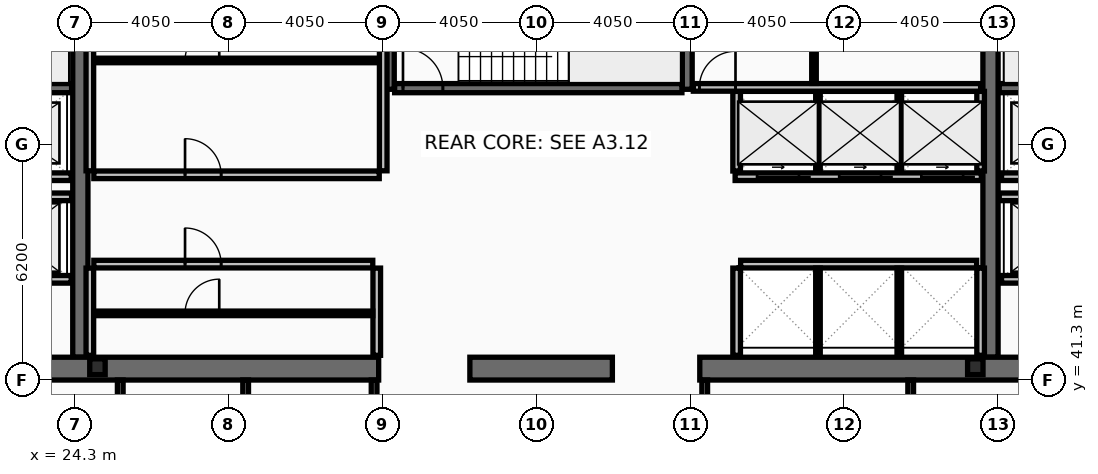
"""IFC4 building model, lengths in metres.
Left out: names, types, materials, properties, quantities, classifications, styles, units other than length and angle.
Written with IfcOpenShell. Run it as: python <this file> out.ifc"""

import sys

from ifc_helpers import new_model, si_unit, direction, frame, frame_2d, origin, origin_2d, place, context, subcontext, project, spatial, rectangle, i_section, extrude, element, fill, save


model = new_model("IFC4")
c1 = context("Model", 3, precision=1e-05, world=origin(), true_north=direction((0.0, 1.0)))
c2 = subcontext(c1, "Body", "Model", "MODEL_VIEW")
j1 = project(units=[si_unit("LENGTHUNIT", "METRE"), si_unit("PLANEANGLEUNIT", "RADIAN")], contexts=[c1])
p1 = place(None, origin())
s1 = spatial("IfcSite", under=j1, at=p1, CompositionType="ELEMENT")
p2 = place(p1, origin())
s2 = spatial("IfcBuilding", under=s1, at=p2, CompositionType="ELEMENT")
p3 = place(p2, frame((0.0, 0.0, 239.0)))
s3 = spatial("IfcBuildingStorey", under=s2, at=p3, CompositionType="ELEMENT", Elevation=239.0)
for number, where, z_axis, x_axis in (
    (1, (24.45, 41.9, 0.0), (0.0, 0.0, 1.0), (0.0, 1.0, 0.0)),
    (2, (48.4, 41.9, 0.0), (0.0, 0.0, 1.0), (0.0, 1.0, 0.0)),
):
    element("IfcWall", number, at=place(p3, frame(where, z_axis=z_axis, x_axis=x_axis)), inside=s3, PredefinedType="SHEAR", context=c2, shape_type="SweptSolid", body=[
        extrude(rectangle(XDim=11.2, YDim=0.4, at=frame_2d((5.6, 0.0))), origin(), (0.0, 0.0, 1.0), 3.44),
    ])
p4 = place(p3, frame((32.3, 41.6, 0.0), z_axis=(0.0, 0.0, 1.0), x_axis=(-1.0, 0.0, 0.0)))
e3 = element("IfcWall", 3, at=p4, inside=s3, PredefinedType="SHEAR", context=c2, shape_type="SweptSolid", body=[
    extrude(rectangle(XDim=11.45, YDim=0.6, at=frame_2d((5.725, 0.0))), origin(), (0.0, 0.0, 1.0), 3.44),
])
p5 = place(p3, frame((38.45, 41.6, 0.0), z_axis=(0.0, 0.0, 1.0), x_axis=(-1.0, 0.0, 0.0)))
e4 = element("IfcWall", 4, at=p5, inside=s3, PredefinedType="SHEAR", context=c2, shape_type="SweptSolid", body=[
    extrude(rectangle(XDim=3.75, YDim=0.6, at=frame_2d((1.875, 0.0))), origin(), (0.0, 0.0, 1.0), 3.44),
])
p6 = place(p3, frame((52.05, 41.6, 0.0), z_axis=(0.0, 0.0, 1.0), x_axis=(-1.0, 0.0, 0.0)))
e5 = element("IfcWall", 5, at=p6, inside=s3, PredefinedType="SHEAR", context=c2, shape_type="SweptSolid", body=[
    extrude(rectangle(XDim=11.3, YDim=0.6, at=frame_2d((5.65, 0.0))), origin(), (0.0, 0.0, 1.0), 3.44),
])
for number, where, z_axis, x_axis in (
    (6, (32.58, 48.95, 0.0), (0.0, 0.0, 1.0), (0.0, 1.0, 0.0)),
    (7, (40.42, 48.95, 0.0), (0.0, 0.0, 1.0), (0.0, 1.0, 0.0)),
):
    element("IfcWall", number, at=place(p3, frame(where, z_axis=z_axis, x_axis=x_axis)), inside=s3, PredefinedType="SHEAR", context=c2, shape_type="SweptSolid", body=[
        extrude(rectangle(XDim=4.15, YDim=0.26, at=frame_2d((2.075, 0.0))), origin(), (0.0, 0.0, 1.0), 3.44),
    ])
p7 = place(p3, frame((16.8, 48.98, 0.0), z_axis=(0.0, 0.0, 1.0), x_axis=(1.0, 0.0, 0.0)))
e8 = element("IfcWall", 8, at=p7, inside=s3, PredefinedType="SHEAR", context=c2, shape_type="SweptSolid", body=[
    extrude(rectangle(XDim=7.42, YDim=0.24, at=frame_2d((3.71, 0.0))), origin(), (0.0, 0.0, 1.0), 3.44),
])
p8 = place(p7, frame((0.22, 0.0, 0.0)))
e9 = element("IfcOpeningElement", 9, at=p8, cuts=e8, PredefinedType="OPENING", context=c2, shape_type="SweptSolid", body=[
    extrude(rectangle(XDim=1.05, YDim=2.15, at=frame_2d((0.525, 1.075))), frame((0.0, 0.13, 0.0), z_axis=(0.0, -1.0, 0.0), x_axis=(1.0, 0.0, 0.0)), (0.0, 0.0, 1.0), 0.26),
])
p9 = place(p3, frame((48.63, 48.98, 0.0), z_axis=(0.0, 0.0, 1.0), x_axis=(1.0, 0.0, 0.0)))
e10 = element("IfcWall", 10, at=p9, inside=s3, PredefinedType="SHEAR", context=c2, shape_type="SweptSolid", body=[
    extrude(rectangle(XDim=7.47, YDim=0.24, at=frame_2d((3.735, 0.0))), origin(), (0.0, 0.0, 1.0), 3.44),
])
p10 = place(p9, frame((6.2, 0.0, 0.0)))
e11 = element("IfcOpeningElement", 11, at=p10, cuts=e10, PredefinedType="OPENING", context=c2, shape_type="SweptSolid", body=[
    extrude(rectangle(XDim=1.05, YDim=2.15, at=frame_2d((0.525, 1.075))), frame((0.0, 0.13, 0.0), z_axis=(0.0, -1.0, 0.0), x_axis=(1.0, 0.0, 0.0)), (0.0, 0.0, 1.0), 0.26),
])
p11 = place(p3, frame((32.72, 48.98, 0.0), z_axis=(0.0, 0.0, 1.0), x_axis=(1.0, 0.0, 0.0)))
e12 = element("IfcWall", 12, at=p11, inside=s3, PredefinedType="SHEAR", context=c2, shape_type="SweptSolid", body=[
    extrude(rectangle(XDim=7.56, YDim=0.24, at=frame_2d((3.78, 0.0))), origin(), (0.0, 0.0, 1.0), 3.44),
])
p12 = place(p11, frame((0.22, 0.0, 0.0)))
e13 = element("IfcOpeningElement", 13, at=p12, cuts=e12, PredefinedType="OPENING", context=c2, shape_type="SweptSolid", body=[
    extrude(rectangle(XDim=1.05, YDim=2.15, at=frame_2d((0.525, 1.075))), frame((0.0, 0.13, 0.0), z_axis=(0.0, -1.0, 0.0), x_axis=(1.0, 0.0, 0.0)), (0.0, 0.0, 1.0), 0.26),
])
for number, where, z_axis, x_axis in (
    (14, (24.9, 41.65, 0.0), (0.0, 0.0, 1.0), (1.0, 0.0, 0.0)),
    (15, (48.0, 41.65, 0.0), (0.0, 0.0, 1.0), (1.0, 0.0, 0.0)),
):
    element("IfcColumn", number, at=place(p3, frame(where, z_axis=z_axis, x_axis=x_axis)), inside=s3, PredefinedType="COLUMN", context=c2, shape_type="SweptSolid", body=[
        extrude(i_section(OverallWidth=0.406, OverallDepth=0.416, WebThickness=0.03, FlangeThickness=0.048, at=origin_2d()), origin(), (0.0, 0.0, 1.0), 3.6),
    ])
p13 = place(p3, frame((51.61, 43.95, 0.0), z_axis=(0.0, 0.0, 1.0), x_axis=(-1.0, 0.0, 0.0)))
e16 = element("IfcWall", 16, at=p13, inside=s3, PredefinedType="PARTITIONING", context=c2, shape_type="SweptSolid", body=[
    extrude(rectangle(XDim=2.92, YDim=0.2, at=frame_2d((1.46, 0.0))), origin(), (0.0, 0.0, 1.0), 3.44),
])
p14 = place(p13, frame((0.81, 0.0, 0.0)))
e17 = element("IfcOpeningElement", 17, at=p14, cuts=e16, PredefinedType="OPENING", context=c2, shape_type="SweptSolid", body=[
    extrude(rectangle(XDim=1.3, YDim=2.18, at=frame_2d((0.65, 1.09))), frame((0.0, 0.11, 0.0), z_axis=(0.0, -1.0, 0.0), x_axis=(1.0, 0.0, 0.0)), (0.0, 0.0, 1.0), 0.22),
])
p15 = place(p3, frame((24.21, 43.95, 0.0), z_axis=(0.0, 0.0, 1.0), x_axis=(-1.0, 0.0, 0.0)))
e18 = element("IfcWall", 18, at=p15, inside=s3, PredefinedType="PARTITIONING", context=c2, shape_type="SweptSolid", body=[
    extrude(rectangle(XDim=2.97, YDim=0.2, at=frame_2d((1.485, 0.0))), origin(), (0.0, 0.0, 1.0), 3.44),
])
p16 = place(p15, frame((0.86, 0.0, 0.0)))
e19 = element("IfcOpeningElement", 19, at=p16, cuts=e18, PredefinedType="OPENING", context=c2, shape_type="SweptSolid", body=[
    extrude(rectangle(XDim=1.3, YDim=2.18, at=frame_2d((0.65, 1.09))), frame((0.0, 0.11, 0.0), z_axis=(0.0, -1.0, 0.0), x_axis=(1.0, 0.0, 0.0)), (0.0, 0.0, 1.0), 0.22),
])
p17 = place(p3, frame((51.61, 46.65, 0.0), z_axis=(0.0, 0.0, 1.0), x_axis=(-1.0, 0.0, 0.0)))
e20 = element("IfcWall", 20, at=p17, inside=s3, PredefinedType="PARTITIONING", context=c2, shape_type="SweptSolid", body=[
    extrude(rectangle(XDim=2.92, YDim=0.2, at=frame_2d((1.46, 0.0))), origin(), (0.0, 0.0, 1.0), 3.44),
])
p18 = place(p17, frame((0.86, 0.0, 0.0)))
e21 = element("IfcOpeningElement", 21, at=p18, cuts=e20, PredefinedType="OPENING", context=c2, shape_type="SweptSolid", body=[
    extrude(rectangle(XDim=1.2, YDim=2.18, at=frame_2d((0.6, 1.09))), frame((0.0, 0.11, 0.0), z_axis=(0.0, -1.0, 0.0), x_axis=(1.0, 0.0, 0.0)), (0.0, 0.0, 1.0), 0.22),
])
p19 = place(p3, frame((24.21, 46.65, 0.0), z_axis=(0.0, 0.0, 1.0), x_axis=(-1.0, 0.0, 0.0)))
e22 = element("IfcWall", 22, at=p19, inside=s3, PredefinedType="PARTITIONING", context=c2, shape_type="SweptSolid", body=[
    extrude(rectangle(XDim=2.97, YDim=0.2, at=frame_2d((1.485, 0.0))), origin(), (0.0, 0.0, 1.0), 3.44),
])
p20 = place(p19, frame((0.91, 0.0, 0.0)))
e23 = element("IfcOpeningElement", 23, at=p20, cuts=e22, PredefinedType="OPENING", context=c2, shape_type="SweptSolid", body=[
    extrude(rectangle(XDim=1.2, YDim=2.18, at=frame_2d((0.6, 1.09))), frame((0.0, 0.11, 0.0), z_axis=(0.0, -1.0, 0.0), x_axis=(1.0, 0.0, 0.0)), (0.0, 0.0, 1.0), 0.22),
])
p21 = place(p3, frame((48.16, 46.65, 0.0), z_axis=(0.0, 0.0, 1.0), x_axis=(-1.0, 0.0, 0.0)))
e24 = element("IfcWall", 24, at=p21, inside=s3, PredefinedType="PARTITIONING", context=c2, shape_type="SweptSolid", body=[
    extrude(rectangle(XDim=6.48, YDim=0.2, at=frame_2d((3.24, 0.0))), origin(), (0.0, 0.0, 1.0), 3.44),
])
p22 = place(p21, frame((4.8, 0.0, 0.0)))
e25 = element("IfcOpeningElement", 25, at=p22, cuts=e24, PredefinedType="OPENING", context=c2, shape_type="SweptSolid", body=[
    extrude(rectangle(XDim=1.1, YDim=2.18, at=frame_2d((0.55, 1.09))), frame((0.0, 0.11, 0.0), z_axis=(0.0, -1.0, 0.0), x_axis=(1.0, 0.0, 0.0)), (0.0, 0.0, 1.0), 0.22),
])
p23 = place(p21, frame((2.64, 0.0, 0.0)))
e26 = element("IfcOpeningElement", 26, at=p23, cuts=e24, PredefinedType="OPENING", context=c2, shape_type="SweptSolid", body=[
    extrude(rectangle(XDim=1.1, YDim=2.18, at=frame_2d((0.55, 1.09))), frame((0.0, 0.11, 0.0), z_axis=(0.0, -1.0, 0.0), x_axis=(1.0, 0.0, 0.0)), (0.0, 0.0, 1.0), 0.22),
])
p24 = place(p21, frame((0.48, 0.0, 0.0)))
e27 = element("IfcOpeningElement", 27, at=p24, cuts=e24, PredefinedType="OPENING", context=c2, shape_type="SweptSolid", body=[
    extrude(rectangle(XDim=1.1, YDim=2.18, at=frame_2d((0.55, 1.09))), frame((0.0, 0.11, 0.0), z_axis=(0.0, -1.0, 0.0), x_axis=(1.0, 0.0, 0.0)), (0.0, 0.0, 1.0), 0.22),
])
p25 = place(p3, frame((21.2, 46.12, 0.0), z_axis=(0.0, 0.0, 1.0), x_axis=(1.0, 0.0, 0.0)))
e28 = element("IfcWall", 28, at=p25, inside=s3, PredefinedType="PARTITIONING", context=c2, shape_type="SweptSolid", body=[
    extrude(rectangle(XDim=3.02, YDim=0.2, at=frame_2d((1.51, 0.0))), origin(), (0.0, 0.0, 1.0), 3.44),
])
p26 = place(p3, frame((48.63, 46.12, 0.0), z_axis=(0.0, 0.0, 1.0), x_axis=(1.0, 0.0, 0.0)))
e29 = element("IfcWall", 29, at=p26, inside=s3, PredefinedType="PARTITIONING", context=c2, shape_type="SweptSolid", body=[
    extrude(rectangle(XDim=3.07, YDim=0.2, at=frame_2d((1.535, 0.0))), origin(), (0.0, 0.0, 1.0), 3.44),
])
for number, where, z_axis, x_axis in (
    (30, (24.7, 46.805, 0.0), (0.0, 0.0, 1.0), (0.0, 1.0, 0.0)),
    (31, (32.42, 46.805, 0.0), (0.0, 0.0, 1.0), (0.0, 1.0, 0.0)),
):
    element("IfcWall", number, at=place(p3, frame(where, z_axis=z_axis, x_axis=x_axis)), inside=s3, PredefinedType="PARTITIONING", context=c2, shape_type="SweptSolid", body=[
        extrude(rectangle(XDim=5.99, YDim=0.2, at=frame_2d((2.995, 0.0))), origin(), (0.0, 0.0, 1.0), 3.44),
    ])
p27 = place(p3, frame((24.805, 49.709, 0.0), z_axis=(0.0, 0.0, 1.0), x_axis=(1.0, 0.0, 0.0)))
e32 = element("IfcWall", 32, at=p27, inside=s3, PredefinedType="PARTITIONING", context=c2, shape_type="SweptSolid", body=[
    extrude(rectangle(XDim=7.51, YDim=0.12, at=frame_2d((3.755, 0.0))), origin(), (0.0, 0.0, 1.0), 3.44),
])
p28 = place(p27, frame((2.4, 0.0, 0.0)))
e33 = element("IfcOpeningElement", 33, at=p28, cuts=e32, PredefinedType="OPENING", context=c2, shape_type="SweptSolid", body=[
    extrude(rectangle(XDim=0.9, YDim=2.05, at=frame_2d((0.45, 1.025))), frame((0.0, 0.07, 0.0), z_axis=(0.0, -1.0, 0.0), x_axis=(1.0, 0.0, 0.0)), (0.0, 0.0, 1.0), 0.14),
])
p29 = place(p3, frame((24.805, 46.7, 0.0), z_axis=(0.0, 0.0, 1.0), x_axis=(1.0, 0.0, 0.0)))
e34 = element("IfcWall", 34, at=p29, inside=s3, PredefinedType="PARTITIONING", context=c2, shape_type="SweptSolid", body=[
    extrude(rectangle(XDim=7.51, YDim=0.2, at=frame_2d((3.755, 0.0))), origin(), (0.0, 0.0, 1.0), 3.44),
])
p30 = place(p29, frame((2.4, 0.0, 0.0)))
e35 = element("IfcOpeningElement", 35, at=p30, cuts=e34, PredefinedType="OPENING", context=c2, shape_type="SweptSolid", body=[
    extrude(rectangle(XDim=0.95, YDim=2.1, at=frame_2d((0.475, 1.05))), frame((0.0, 0.11, 0.0), z_axis=(0.0, -1.0, 0.0), x_axis=(1.0, 0.0, 0.0)), (0.0, 0.0, 1.0), 0.22),
])
for number, where, z_axis, x_axis in (
    (36, (24.7, 41.95, 0.0), (0.0, 0.0, 1.0), (0.0, 1.0, 0.0)),
    (37, (32.25, 41.95, 0.0), (0.0, 0.0, 1.0), (0.0, 1.0, 0.0)),
):
    element("IfcWall", number, at=place(p3, frame(where, z_axis=z_axis, x_axis=x_axis)), inside=s3, PredefinedType="PARTITIONING", context=c2, shape_type="SweptSolid", body=[
        extrude(rectangle(XDim=2.295, YDim=0.2, at=frame_2d((1.147, 0.0))), origin(), (0.0, 0.0, 1.0), 3.44),
    ])
p31 = place(p3, frame((24.805, 43.054, 0.0), z_axis=(0.0, 0.0, 1.0), x_axis=(1.0, 0.0, 0.0)))
e38 = element("IfcWall", 38, at=p31, inside=s3, PredefinedType="PARTITIONING", context=c2, shape_type="SweptSolid", body=[
    extrude(rectangle(XDim=7.34, YDim=0.12, at=frame_2d((3.67, 0.0))), origin(), (0.0, 0.0, 1.0), 3.44),
])
p32 = place(p31, frame((2.4, 0.0, 0.0)))
e39 = element("IfcOpeningElement", 39, at=p32, cuts=e38, PredefinedType="OPENING", context=c2, shape_type="SweptSolid", body=[
    extrude(rectangle(XDim=0.9, YDim=2.05, at=frame_2d((0.45, 1.025))), frame((0.0, 0.07, 0.0), z_axis=(0.0, -1.0, 0.0), x_axis=(1.0, 0.0, 0.0)), (0.0, 0.0, 1.0), 0.14),
])
p33 = place(p3, frame((24.805, 44.35, 0.0), z_axis=(0.0, 0.0, 1.0), x_axis=(1.0, 0.0, 0.0)))
e40 = element("IfcWall", 40, at=p33, inside=s3, PredefinedType="PARTITIONING", context=c2, shape_type="SweptSolid", body=[
    extrude(rectangle(XDim=7.34, YDim=0.2, at=frame_2d((3.67, 0.0))), origin(), (0.0, 0.0, 1.0), 3.44),
])
p34 = place(p33, frame((2.4, 0.0, 0.0)))
e41 = element("IfcOpeningElement", 41, at=p34, cuts=e40, PredefinedType="OPENING", context=c2, shape_type="SweptSolid", body=[
    extrude(rectangle(XDim=0.95, YDim=2.1, at=frame_2d((0.475, 1.05))), frame((0.0, 0.11, 0.0), z_axis=(0.0, -1.0, 0.0), x_axis=(1.0, 0.0, 0.0)), (0.0, 0.0, 1.0), 0.22),
])
for number, where, z_axis, x_axis in (
    (42, (41.72, 46.8, 0.0), (0.0, 0.0, 1.0), (0.0, 1.0, 0.0)),
    (43, (48.14, 46.8, 0.0), (0.0, 0.0, 1.0), (0.0, 1.0, 0.0)),
):
    element("IfcWall", number, at=place(p3, frame(where, z_axis=z_axis, x_axis=x_axis)), inside=s3, PredefinedType="PARTITIONING", context=c2, shape_type="SweptSolid", body=[
        extrude(rectangle(XDim=2.095, YDim=0.2, at=frame_2d((1.047, 0.0))), origin(), (0.0, 0.0, 1.0), 3.44),
    ])
for number, where, z_axis, x_axis in (
    (44, (43.86, 46.8, 0.0), (0.0, 0.0, 1.0), (0.0, 1.0, 0.0)),
    (45, (46.0, 46.8, 0.0), (0.0, 0.0, 1.0), (0.0, 1.0, 0.0)),
):
    element("IfcWall", number, at=place(p3, frame(where, z_axis=z_axis, x_axis=x_axis)), inside=s3, PredefinedType="PARTITIONING", context=c2, shape_type="SweptSolid", body=[
        extrude(rectangle(XDim=2.095, YDim=0.12, at=frame_2d((1.047, 0.0))), origin(), (0.0, 0.0, 1.0), 3.44),
    ])
p35 = place(p3, frame((41.825, 44.35, 0.0), z_axis=(0.0, 0.0, 1.0), x_axis=(1.0, 0.0, 0.0)))
e46 = element("IfcWall", 46, at=p35, inside=s3, PredefinedType="PARTITIONING", context=c2, shape_type="SweptSolid", body=[
    extrude(rectangle(XDim=6.21, YDim=0.2, at=frame_2d((3.105, 0.0))), origin(), (0.0, 0.0, 1.0), 3.44),
])
for number, where, z_axis, x_axis in (
    (47, (41.72, 41.95, 0.0), (0.0, 0.0, 1.0), (0.0, 1.0, 0.0)),
    (48, (48.14, 41.95, 0.0), (0.0, 0.0, 1.0), (0.0, 1.0, 0.0)),
):
    element("IfcWall", number, at=place(p3, frame(where, z_axis=z_axis, x_axis=x_axis)), inside=s3, PredefinedType="PARTITIONING", context=c2, shape_type="SweptSolid", body=[
        extrude(rectangle(XDim=2.295, YDim=0.2, at=frame_2d((1.147, 0.0))), origin(), (0.0, 0.0, 1.0), 3.44),
    ])
for number, where, z_axis, x_axis in (
    (49, (43.86, 41.95, 0.0), (0.0, 0.0, 1.0), (0.0, 1.0, 0.0)),
    (50, (46.0, 41.95, 0.0), (0.0, 0.0, 1.0), (0.0, 1.0, 0.0)),
):
    element("IfcWall", number, at=place(p3, frame(where, z_axis=z_axis, x_axis=x_axis)), inside=s3, PredefinedType="PARTITIONING", context=c2, shape_type="SweptSolid", body=[
        extrude(rectangle(XDim=2.295, YDim=0.12, at=frame_2d((1.147, 0.0))), origin(), (0.0, 0.0, 1.0), 3.44),
    ])
p36 = place(p3, frame((40.58, 49.0, 0.0), z_axis=(0.0, 0.0, 1.0), x_axis=(1.0, 0.0, 0.0)))
e51 = element("IfcWall", 51, at=p36, inside=s3, PredefinedType="PARTITIONING", context=c2, shape_type="SweptSolid", body=[
    extrude(rectangle(XDim=7.56, YDim=0.2, at=frame_2d((3.78, 0.0))), origin(), (0.0, 0.0, 1.0), 3.44),
])
p37 = place(p36, frame((0.16, 0.0, 0.0)))
e52 = element("IfcOpeningElement", 52, at=p37, cuts=e51, PredefinedType="OPENING", context=c2, shape_type="SweptSolid", body=[
    extrude(rectangle(XDim=0.95, YDim=2.1, at=frame_2d((0.475, 1.05))), frame((0.0, 0.11, 0.0), z_axis=(0.0, -1.0, 0.0), x_axis=(1.0, 0.0, 0.0)), (0.0, 0.0, 1.0), 0.22),
])
p38 = place(p3, frame((43.755, 49.105, 0.0), z_axis=(0.0, 0.0, 1.0), x_axis=(0.0, 1.0, 0.0)))
e53 = element("IfcWall", 53, at=p38, inside=s3, PredefinedType="PARTITIONING", context=c2, shape_type="SweptSolid", body=[
    extrude(rectangle(XDim=3.69, YDim=0.12, at=frame_2d((1.845, 0.0))), origin(), (0.0, 0.0, 1.0), 3.44),
])
p39 = place(p38, frame((1.05, 0.0, 0.0)))
e54 = element("IfcOpeningElement", 54, at=p39, cuts=e53, PredefinedType="OPENING", context=c2, shape_type="SweptSolid", body=[
    extrude(rectangle(XDim=0.9, YDim=2.05, at=frame_2d((0.45, 1.025))), frame((0.0, 0.07, 0.0), z_axis=(0.0, -1.0, 0.0), x_axis=(1.0, 0.0, 0.0)), (0.0, 0.0, 1.0), 0.14),
])
for number, where, z_axis, x_axis in (
    (55, (25.5, 38.28, 0.0), (0.0, 0.0, 1.0), (0.0, 1.0, 0.0)),
    (56, (28.8, 38.28, 0.0), (0.0, 0.0, 1.0), (0.0, 1.0, 0.0)),
    (57, (32.18, 38.28, 0.0), (0.0, 0.0, 1.0), (0.0, 1.0, 0.0)),
    (58, (40.88, 38.28, 0.0), (0.0, 0.0, 1.0), (0.0, 1.0, 0.0)),
    (59, (46.3, 38.28, 0.0), (0.0, 0.0, 1.0), (0.0, 1.0, 0.0)),
):
    element("IfcWall", number, at=place(p3, frame(where, z_axis=z_axis, x_axis=x_axis)), inside=s3, PredefinedType="PARTITIONING", context=c2, shape_type="SweptSolid", body=[
        extrude(rectangle(XDim=3.02, YDim=0.15, at=frame_2d((1.51, 0.0))), origin(), (0.0, 0.0, 1.0), 3.44),
    ])
p40 = place(p12, origin())
e60 = element("IfcDoor", 60, at=p40, inside=s3, OperationType="SINGLE_SWING_LEFT", PredefinedType="DOOR", context=c2, shape_type="SweptSolid", body=[
    extrude(rectangle(XDim=1.05, YDim=2.15, at=frame_2d((0.525, 1.075))), frame((0.0, 0.025, 0.0), z_axis=(0.0, -1.0, 0.0), x_axis=(1.0, 0.0, 0.0)), (0.0, 0.0, 1.0), 0.05),
])
fill(e13, e60)
p41 = place(p22, origin())
e61 = element("IfcDoor", 61, at=p41, inside=s3, OperationType="SLIDING_TO_LEFT", PredefinedType="DOOR", context=c2, shape_type="SweptSolid", body=[
    extrude(rectangle(XDim=1.1, YDim=2.18, at=frame_2d((0.55, 1.09))), frame((0.0, 0.025, 0.0), z_axis=(0.0, -1.0, 0.0), x_axis=(1.0, 0.0, 0.0)), (0.0, 0.0, 1.0), 0.05),
])
fill(e25, e61)
p42 = place(p23, origin())
e62 = element("IfcDoor", 62, at=p42, inside=s3, OperationType="SLIDING_TO_LEFT", PredefinedType="DOOR", context=c2, shape_type="SweptSolid", body=[
    extrude(rectangle(XDim=1.1, YDim=2.18, at=frame_2d((0.55, 1.09))), frame((0.0, 0.025, 0.0), z_axis=(0.0, -1.0, 0.0), x_axis=(1.0, 0.0, 0.0)), (0.0, 0.0, 1.0), 0.05),
])
fill(e26, e62)
p43 = place(p24, origin())
e63 = element("IfcDoor", 63, at=p43, inside=s3, OperationType="SLIDING_TO_LEFT", PredefinedType="DOOR", context=c2, shape_type="SweptSolid", body=[
    extrude(rectangle(XDim=1.1, YDim=2.18, at=frame_2d((0.55, 1.09))), frame((0.0, 0.025, 0.0), z_axis=(0.0, -1.0, 0.0), x_axis=(1.0, 0.0, 0.0)), (0.0, 0.0, 1.0), 0.05),
])
fill(e27, e63)
p44 = place(p28, origin())
e64 = element("IfcDoor", 64, at=p44, inside=s3, OperationType="SINGLE_SWING_RIGHT", PredefinedType="DOOR", context=c2, shape_type="SweptSolid", body=[
    extrude(rectangle(XDim=0.9, YDim=2.05, at=frame_2d((0.45, 1.025))), frame((0.0, 0.025, 0.0), z_axis=(0.0, -1.0, 0.0), x_axis=(1.0, 0.0, 0.0)), (0.0, 0.0, 1.0), 0.05),
])
fill(e33, e64)
p45 = place(p30, origin())
e65 = element("IfcDoor", 65, at=p45, inside=s3, OperationType="SINGLE_SWING_LEFT", PredefinedType="DOOR", context=c2, shape_type="SweptSolid", body=[
    extrude(rectangle(XDim=0.95, YDim=2.1, at=frame_2d((0.475, 1.05))), frame((0.0, 0.025, 0.0), z_axis=(0.0, -1.0, 0.0), x_axis=(1.0, 0.0, 0.0)), (0.0, 0.0, 1.0), 0.05),
])
fill(e35, e65)
p46 = place(p32, origin())
e66 = element("IfcDoor", 66, at=p46, inside=s3, OperationType="SINGLE_SWING_RIGHT", PredefinedType="DOOR", context=c2, shape_type="SweptSolid", body=[
    extrude(rectangle(XDim=0.9, YDim=2.05, at=frame_2d((0.45, 1.025))), frame((0.0, 0.025, 0.0), z_axis=(0.0, -1.0, 0.0), x_axis=(1.0, 0.0, 0.0)), (0.0, 0.0, 1.0), 0.05),
])
fill(e39, e66)
p47 = place(p34, origin())
e67 = element("IfcDoor", 67, at=p47, inside=s3, OperationType="SINGLE_SWING_LEFT", PredefinedType="DOOR", context=c2, shape_type="SweptSolid", body=[
    extrude(rectangle(XDim=0.95, YDim=2.1, at=frame_2d((0.475, 1.05))), frame((0.0, 0.025, 0.0), z_axis=(0.0, -1.0, 0.0), x_axis=(1.0, 0.0, 0.0)), (0.0, 0.0, 1.0), 0.05),
])
fill(e41, e67)
p48 = place(p37, origin())
e68 = element("IfcDoor", 68, at=p48, inside=s3, OperationType="SINGLE_SWING_RIGHT", PredefinedType="DOOR", context=c2, shape_type="SweptSolid", body=[
    extrude(rectangle(XDim=0.95, YDim=2.1, at=frame_2d((0.475, 1.05))), frame((0.0, 0.025, 0.0), z_axis=(0.0, -1.0, 0.0), x_axis=(1.0, 0.0, 0.0)), (0.0, 0.0, 1.0), 0.05),
])
fill(e52, e68)
save(model, sys.argv[1])
